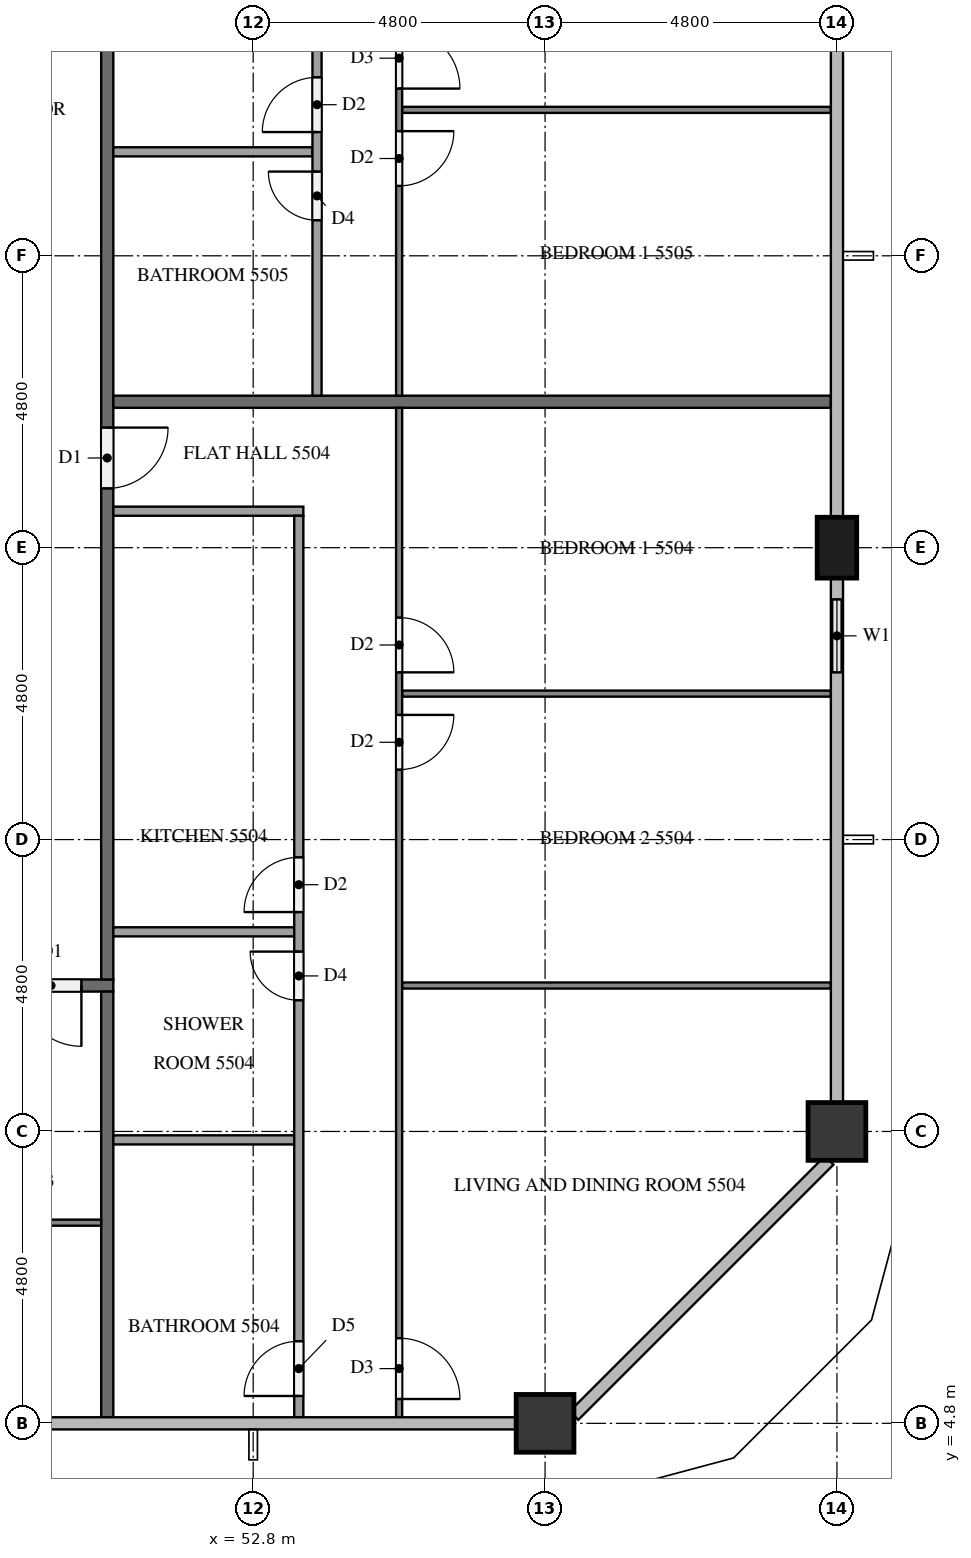
"""IFC4 building model, lengths in metres.
Left out: names, types, materials, properties, quantities, classifications, styles, units other than length and angle.
Written with IfcOpenShell. Run it as: python <this file> out.ifc"""

import sys

from ifc_helpers import new_model, si_unit, direction, frame, frame_2d, origin, origin_2d, place, context, subcontext, project, spatial, rectangle, extrude, element, fill, save


model = new_model("IFC4")
c1 = context("Model", 3, precision=1e-05, world=origin(), true_north=direction((0.0, 1.0)))
c2 = subcontext(c1, "Body", "Model", "MODEL_VIEW")
j1 = project(units=[si_unit("LENGTHUNIT", "METRE"), si_unit("PLANEANGLEUNIT", "RADIAN")], contexts=[c1])
p1 = place(None, origin())
s1 = spatial("IfcSite", under=j1, at=p1, CompositionType="ELEMENT")
p2 = place(p1, origin())
s2 = spatial("IfcBuilding", under=s1, at=p2, CompositionType="ELEMENT")
p3 = place(p2, frame((0.0, 0.0, 212.3)))
s3 = spatial("IfcBuildingStorey", under=s2, at=p3, CompositionType="ELEMENT", Elevation=212.3)
for number, where, z_axis, x_axis in (
    (1, (57.6, 4.8, 0.0), (0.0, 0.0, 1.0), (1.0, 0.0, 0.0)),
    (2, (62.4, 9.6, 0.0), (0.0, 0.0, 1.0), (1.0, 0.0, 0.0)),
):
    element("IfcColumn", number, at=place(p3, frame(where, z_axis=z_axis, x_axis=x_axis)), inside=s3, PredefinedType="COLUMN", context=c2, shape_type="SweptSolid", body=[
        extrude(rectangle(XDim=0.95, YDim=0.95, at=origin_2d()), origin(), (0.0, 0.0, 1.0), 3.2),
    ])
p4 = place(p3, frame((62.4, 19.2, 0.0), z_axis=(0.0, 0.0, 1.0), x_axis=(0.0, 1.0, 0.0)))
e3 = element("IfcColumn", 3, at=p4, inside=s3, PredefinedType="COLUMN", context=c2, shape_type="SweptSolid", body=[
    extrude(rectangle(XDim=1.0, YDim=0.65, at=origin_2d()), origin(), (0.0, 0.0, 1.0), 3.2),
])
p5 = place(p3, frame((62.4, 16.8, 0.0), z_axis=(0.0, 0.0, 1.0), x_axis=(0.0, 1.0, 0.0)))
e4 = element("IfcWall", 4, at=p5, inside=s3, PredefinedType="SOLIDWALL", context=c2, shape_type="SweptSolid", body=[
    extrude(rectangle(XDim=1.9, YDim=0.15, at=frame_2d((0.95, 0.0))), origin(), (0.0, 0.0, 1.0), 3.2),
])
p6 = place(p5, frame((0.35, 0.0, 0.9)))
e5 = element("IfcOpeningElement", 5, at=p6, cuts=e4, PredefinedType="OPENING", context=c2, shape_type="SweptSolid", body=[
    extrude(rectangle(XDim=1.2, YDim=1.4, at=frame_2d((0.6, 0.7))), frame((0.0, 0.085, 0.0), z_axis=(0.0, -1.0, 0.0), x_axis=(1.0, 0.0, 0.0)), (0.0, 0.0, 1.0), 0.17),
])
p7 = place(p3, frame((50.5, 12.0, 0.0), z_axis=(0.0, 0.0, 1.0), x_axis=(-1.0, 0.0, 0.0)))
e6 = element("IfcWall", 6, at=p7, inside=s3, PredefinedType="PARTITIONING", context=c2, shape_type="SweptSolid", body=[
    extrude(rectangle(XDim=38.6, YDim=0.2, at=frame_2d((19.3, 0.0))), origin(), (0.0, 0.0, 1.0), 3.2),
])
p8 = place(p7, frame((37.075, 0.0, 0.0)))
e7 = element("IfcOpeningElement", 7, at=p8, cuts=e6, PredefinedType="OPENING", context=c2, shape_type="SweptSolid", body=[
    extrude(rectangle(XDim=1.0, YDim=2.1, at=frame_2d((0.5, 1.05))), frame((0.0, 0.11, 0.0), z_axis=(0.0, -1.0, 0.0), x_axis=(1.0, 0.0, 0.0)), (0.0, 0.0, 1.0), 0.22),
])
p9 = place(p7, frame((20.275, 0.0, 0.0)))
e8 = element("IfcOpeningElement", 8, at=p9, cuts=e6, PredefinedType="OPENING", context=c2, shape_type="SweptSolid", body=[
    extrude(rectangle(XDim=1.0, YDim=2.1, at=frame_2d((0.5, 1.05))), frame((0.0, 0.11, 0.0), z_axis=(0.0, -1.0, 0.0), x_axis=(1.0, 0.0, 0.0)), (0.0, 0.0, 1.0), 0.22),
])
p10 = place(p7, frame((0.525, 0.0, 0.0)))
e9 = element("IfcOpeningElement", 9, at=p10, cuts=e6, PredefinedType="OPENING", context=c2, shape_type="SweptSolid", body=[
    extrude(rectangle(XDim=1.0, YDim=2.1, at=frame_2d((0.5, 1.05))), frame((0.0, 0.11, 0.0), z_axis=(0.0, -1.0, 0.0), x_axis=(1.0, 0.0, 0.0)), (0.0, 0.0, 1.0), 0.22),
])
p11 = place(p3, frame((50.4, 40.7, 0.0), z_axis=(0.0, 0.0, 1.0), x_axis=(0.0, -1.0, 0.0)))
e10 = element("IfcWall", 10, at=p11, inside=s3, PredefinedType="PARTITIONING", context=c2, shape_type="SweptSolid", body=[
    extrude(rectangle(XDim=28.6, YDim=0.2, at=frame_2d((14.3, 0.0))), origin(), (0.0, 0.0, 1.0), 3.2),
])
p12 = place(p11, frame((19.525, 0.0, 0.0)))
e11 = element("IfcOpeningElement", 11, at=p12, cuts=e10, PredefinedType="OPENING", context=c2, shape_type="SweptSolid", body=[
    extrude(rectangle(XDim=1.0, YDim=2.1, at=frame_2d((0.5, 1.05))), frame((0.0, 0.11, 0.0), z_axis=(0.0, -1.0, 0.0), x_axis=(1.0, 0.0, 0.0)), (0.0, 0.0, 1.0), 0.22),
])
p13 = place(p11, frame((7.525, 0.0, 0.0)))
e12 = element("IfcOpeningElement", 12, at=p13, cuts=e10, PredefinedType="OPENING", context=c2, shape_type="SweptSolid", body=[
    extrude(rectangle(XDim=1.0, YDim=2.1, at=frame_2d((0.5, 1.05))), frame((0.0, 0.11, 0.0), z_axis=(0.0, -1.0, 0.0), x_axis=(1.0, 0.0, 0.0)), (0.0, 0.0, 1.0), 0.22),
])
p14 = place(p11, frame((0.325, 0.0, 0.0)))
e13 = element("IfcOpeningElement", 13, at=p14, cuts=e10, PredefinedType="OPENING", context=c2, shape_type="SweptSolid", body=[
    extrude(rectangle(XDim=1.0, YDim=2.1, at=frame_2d((0.5, 1.05))), frame((0.0, 0.11, 0.0), z_axis=(0.0, -1.0, 0.0), x_axis=(1.0, 0.0, 0.0)), (0.0, 0.0, 1.0), 0.22),
])
p15 = place(p3, frame((50.4, 11.9, 0.0), z_axis=(0.0, 0.0, 1.0), x_axis=(0.0, -1.0, 0.0)))
e14 = element("IfcWall", 14, at=p15, inside=s3, PredefinedType="PARTITIONING", context=c2, shape_type="SweptSolid", body=[
    extrude(rectangle(XDim=7.0, YDim=0.2, at=frame_2d((3.5, 0.0))), origin(), (0.0, 0.0, 1.0), 3.2),
])
p16 = place(p3, frame((50.5, 21.6, 0.0), z_axis=(0.0, 0.0, 1.0), x_axis=(1.0, 0.0, 0.0)))
e15 = element("IfcWall", 15, at=p16, inside=s3, PredefinedType="PARTITIONING", context=c2, shape_type="SweptSolid", body=[
    extrude(rectangle(XDim=11.8, YDim=0.2, at=frame_2d((5.9, 0.0))), origin(), (0.0, 0.0, 1.0), 3.2),
])
p17 = place(p3, frame((50.3, 8.1, 0.0), z_axis=(0.0, 0.0, 1.0), x_axis=(-1.0, 0.0, 0.0)))
e16 = element("IfcWall", 16, at=p17, inside=s3, PredefinedType="PARTITIONING", context=c2, shape_type="SweptSolid", body=[
    extrude(rectangle(XDim=9.4, YDim=0.1, at=frame_2d((4.7, 0.0))), origin(), (0.0, 0.0, 1.0), 3.2),
])
p18 = place(p17, frame((3.35, 0.0, 0.0)))
e17 = element("IfcOpeningElement", 17, at=p18, cuts=e16, PredefinedType="OPENING", context=c2, shape_type="SweptSolid", body=[
    extrude(rectangle(XDim=1.0, YDim=2.1, at=frame_2d((0.5, 1.05))), frame((0.0, 0.06, 0.0), z_axis=(0.0, -1.0, 0.0), x_axis=(1.0, 0.0, 0.0)), (0.0, 0.0, 1.0), 0.12),
])
p19 = place(p17, frame((5.05, 0.0, 0.0)))
e18 = element("IfcOpeningElement", 18, at=p19, cuts=e16, PredefinedType="OPENING", context=c2, shape_type="SweptSolid", body=[
    extrude(rectangle(XDim=0.9, YDim=2.1, at=frame_2d((0.45, 1.05))), frame((0.0, 0.06, 0.0), z_axis=(0.0, -1.0, 0.0), x_axis=(1.0, 0.0, 0.0)), (0.0, 0.0, 1.0), 0.12),
])
for number, where, z_axis, x_axis in (
    (19, (55.25, 16.8, 0.0), (0.0, 0.0, 1.0), (1.0, 0.0, 0.0)),
    (20, (55.25, 12.0, 0.0), (0.0, 0.0, 1.0), (1.0, 0.0, 0.0)),
):
    element("IfcWall", number, at=place(p3, frame(where, z_axis=z_axis, x_axis=x_axis)), inside=s3, PredefinedType="PARTITIONING", context=c2, shape_type="SweptSolid", body=[
        extrude(rectangle(XDim=7.05, YDim=0.1, at=frame_2d((3.525, 0.0))), origin(), (0.0, 0.0, 1.0), 3.2),
    ])
p20 = place(p3, frame((55.2, 21.5, 0.0), z_axis=(0.0, 0.0, 1.0), x_axis=(0.0, -1.0, 0.0)))
e21 = element("IfcWall", 21, at=p20, inside=s3, PredefinedType="PARTITIONING", context=c2, shape_type="SweptSolid", body=[
    extrude(rectangle(XDim=16.6, YDim=0.1, at=frame_2d((8.3, 0.0))), origin(), (0.0, 0.0, 1.0), 3.2),
])
p21 = place(p20, frame((3.45, 0.0, 0.0)))
e22 = element("IfcOpeningElement", 22, at=p21, cuts=e21, PredefinedType="OPENING", context=c2, shape_type="SweptSolid", body=[
    extrude(rectangle(XDim=0.9, YDim=2.1, at=frame_2d((0.45, 1.05))), frame((0.0, 0.06, 0.0), z_axis=(0.0, -1.0, 0.0), x_axis=(1.0, 0.0, 0.0)), (0.0, 0.0, 1.0), 0.12),
])
p22 = place(p20, frame((5.05, 0.0, 0.0)))
e23 = element("IfcOpeningElement", 23, at=p22, cuts=e21, PredefinedType="OPENING", context=c2, shape_type="SweptSolid", body=[
    extrude(rectangle(XDim=0.9, YDim=2.1, at=frame_2d((0.45, 1.05))), frame((0.0, 0.06, 0.0), z_axis=(0.0, -1.0, 0.0), x_axis=(1.0, 0.0, 0.0)), (0.0, 0.0, 1.0), 0.12),
])
p23 = place(p20, frame((15.3, 0.0, 0.0)))
e24 = element("IfcOpeningElement", 24, at=p23, cuts=e21, PredefinedType="OPENING", context=c2, shape_type="SweptSolid", body=[
    extrude(rectangle(XDim=1.0, YDim=2.1, at=frame_2d((0.5, 1.05))), frame((0.0, 0.06, 0.0), z_axis=(0.0, -1.0, 0.0), x_axis=(1.0, 0.0, 0.0)), (0.0, 0.0, 1.0), 0.12),
])
for number, where, z_axis, x_axis in (
    (25, (50.5, 12.883, 0.0), (0.0, 0.0, 1.0), (1.0, 0.0, 0.0)),
    (26, (50.5, 9.461, 0.0), (0.0, 0.0, 1.0), (1.0, 0.0, 0.0)),
):
    element("IfcWall", number, at=place(p3, frame(where, z_axis=z_axis, x_axis=x_axis)), inside=s3, PredefinedType="PARTITIONING", context=c2, shape_type="SweptSolid", body=[
        extrude(rectangle(XDim=2.975, YDim=0.15, at=frame_2d((1.488, 0.0))), origin(), (0.0, 0.0, 1.0), 3.2),
    ])
p24 = place(p3, frame((50.5, 19.8, 0.0), z_axis=(0.0, 0.0, 1.0), x_axis=(1.0, 0.0, 0.0)))
e27 = element("IfcWall", 27, at=p24, inside=s3, PredefinedType="PARTITIONING", context=c2, shape_type="SweptSolid", body=[
    extrude(rectangle(XDim=3.125, YDim=0.15, at=frame_2d((1.562, 0.0))), origin(), (0.0, 0.0, 1.0), 3.2),
])
p25 = place(p3, frame((53.55, 4.9, 0.0), z_axis=(0.0, 0.0, 1.0), x_axis=(0.0, 1.0, 0.0)))
e28 = element("IfcWall", 28, at=p25, inside=s3, PredefinedType="PARTITIONING", context=c2, shape_type="SweptSolid", body=[
    extrude(rectangle(XDim=14.825, YDim=0.15, at=frame_2d((7.413, 0.0))), origin(), (0.0, 0.0, 1.0), 3.2),
])
p26 = place(p25, frame((8.308, 0.0, 0.0)))
e29 = element("IfcOpeningElement", 29, at=p26, cuts=e28, PredefinedType="OPENING", context=c2, shape_type="SweptSolid", body=[
    extrude(rectangle(XDim=0.9, YDim=2.1, at=frame_2d((0.45, 1.05))), frame((0.0, 0.085, 0.0), z_axis=(0.0, -1.0, 0.0), x_axis=(1.0, 0.0, 0.0)), (0.0, 0.0, 1.0), 0.17),
])
p27 = place(p25, frame((6.858, 0.0, 0.0)))
e30 = element("IfcOpeningElement", 30, at=p27, cuts=e28, PredefinedType="OPENING", context=c2, shape_type="SweptSolid", body=[
    extrude(rectangle(XDim=0.8, YDim=2.1, at=frame_2d((0.4, 1.05))), frame((0.0, 0.085, 0.0), z_axis=(0.0, -1.0, 0.0), x_axis=(1.0, 0.0, 0.0)), (0.0, 0.0, 1.0), 0.17),
])
p28 = place(p25, frame((0.35, 0.0, 0.0)))
e31 = element("IfcOpeningElement", 31, at=p28, cuts=e28, PredefinedType="OPENING", context=c2, shape_type="SweptSolid", body=[
    extrude(rectangle(XDim=0.9, YDim=2.1, at=frame_2d((0.45, 1.05))), frame((0.0, 0.085, 0.0), z_axis=(0.0, -1.0, 0.0), x_axis=(1.0, 0.0, 0.0)), (0.0, 0.0, 1.0), 0.17),
])
p29 = place(p3, frame((55.25, 26.4, 0.0), z_axis=(0.0, 0.0, 1.0), x_axis=(1.0, 0.0, 0.0)))
e32 = element("IfcWall", 32, at=p29, inside=s3, PredefinedType="PARTITIONING", context=c2, shape_type="SweptSolid", body=[
    extrude(rectangle(XDim=7.05, YDim=0.1, at=frame_2d((3.525, 0.0))), origin(), (0.0, 0.0, 1.0), 3.2),
])
p30 = place(p3, frame((55.2, 33.5, 0.0), z_axis=(0.0, 0.0, 1.0), x_axis=(0.0, -1.0, 0.0)))
e33 = element("IfcWall", 33, at=p30, inside=s3, PredefinedType="PARTITIONING", context=c2, shape_type="SweptSolid", body=[
    extrude(rectangle(XDim=11.8, YDim=0.1, at=frame_2d((5.9, 0.0))), origin(), (0.0, 0.0, 1.0), 3.2),
])
p31 = place(p30, frame((5.75, 0.0, 0.0)))
e34 = element("IfcOpeningElement", 34, at=p31, cuts=e33, PredefinedType="OPENING", context=c2, shape_type="SweptSolid", body=[
    extrude(rectangle(XDim=1.0, YDim=2.1, at=frame_2d((0.5, 1.05))), frame((0.0, 0.06, 0.0), z_axis=(0.0, -1.0, 0.0), x_axis=(1.0, 0.0, 0.0)), (0.0, 0.0, 1.0), 0.12),
])
p32 = place(p30, frame((7.45, 0.0, 0.0)))
e35 = element("IfcOpeningElement", 35, at=p32, cuts=e33, PredefinedType="OPENING", context=c2, shape_type="SweptSolid", body=[
    extrude(rectangle(XDim=0.9, YDim=2.1, at=frame_2d((0.45, 1.05))), frame((0.0, 0.06, 0.0), z_axis=(0.0, -1.0, 0.0), x_axis=(1.0, 0.0, 0.0)), (0.0, 0.0, 1.0), 0.12),
])
p33 = place(p3, frame((50.5, 25.71, 0.0), z_axis=(0.0, 0.0, 1.0), x_axis=(1.0, 0.0, 0.0)))
e36 = element("IfcWall", 36, at=p33, inside=s3, PredefinedType="PARTITIONING", context=c2, shape_type="SweptSolid", body=[
    extrude(rectangle(XDim=3.275, YDim=0.15, at=frame_2d((1.637, 0.0))), origin(), (0.0, 0.0, 1.0), 3.2),
])
p34 = place(p3, frame((53.85, 21.7, 0.0), z_axis=(0.0, 0.0, 1.0), x_axis=(0.0, 1.0, 0.0)))
e37 = element("IfcWall", 37, at=p34, inside=s3, PredefinedType="PARTITIONING", context=c2, shape_type="SweptSolid", body=[
    extrude(rectangle(XDim=10.025, YDim=0.15, at=frame_2d((5.013, 0.0))), origin(), (0.0, 0.0, 1.0), 3.2),
])
p35 = place(p34, frame((4.335, 0.0, 0.0)))
e38 = element("IfcOpeningElement", 38, at=p35, cuts=e37, PredefinedType="OPENING", context=c2, shape_type="SweptSolid", body=[
    extrude(rectangle(XDim=0.9, YDim=2.1, at=frame_2d((0.45, 1.05))), frame((0.0, 0.085, 0.0), z_axis=(0.0, -1.0, 0.0), x_axis=(1.0, 0.0, 0.0)), (0.0, 0.0, 1.0), 0.17),
])
p36 = place(p34, frame((2.885, 0.0, 0.0)))
e39 = element("IfcOpeningElement", 39, at=p36, cuts=e37, PredefinedType="OPENING", context=c2, shape_type="SweptSolid", body=[
    extrude(rectangle(XDim=0.8, YDim=2.1, at=frame_2d((0.4, 1.05))), frame((0.0, 0.085, 0.0), z_axis=(0.0, -1.0, 0.0), x_axis=(1.0, 0.0, 0.0)), (0.0, 0.0, 1.0), 0.17),
])
p37 = place(p6, origin())
e40 = element("IfcWindow", 40, at=p37, inside=s3, PartitioningType="SINGLE_PANEL", PredefinedType="WINDOW", context=c2, shape_type="SweptSolid", body=[
    extrude(rectangle(XDim=1.2, YDim=1.4, at=frame_2d((0.6, 0.7))), frame((0.0, 0.03, 0.0), z_axis=(0.0, -1.0, 0.0), x_axis=(1.0, 0.0, 0.0)), (0.0, 0.0, 1.0), 0.06),
])
fill(e5, e40)
p38 = place(p10, origin())
e41 = element("IfcDoor", 41, at=p38, inside=s3, OperationType="SINGLE_SWING_LEFT", PredefinedType="DOOR", context=c2, shape_type="SweptSolid", body=[
    extrude(rectangle(XDim=1.0, YDim=2.1, at=frame_2d((0.5, 1.05))), frame((0.0, 0.025, 0.0), z_axis=(0.0, -1.0, 0.0), x_axis=(1.0, 0.0, 0.0)), (0.0, 0.0, 1.0), 0.05),
])
fill(e9, e41)
p39 = place(p12, origin())
e42 = element("IfcDoor", 42, at=p39, inside=s3, OperationType="SINGLE_SWING_LEFT", PredefinedType="DOOR", context=c2, shape_type="SweptSolid", body=[
    extrude(rectangle(XDim=1.0, YDim=2.1, at=frame_2d((0.5, 1.05))), frame((0.0, 0.025, 0.0), z_axis=(0.0, -1.0, 0.0), x_axis=(1.0, 0.0, 0.0)), (0.0, 0.0, 1.0), 0.05),
])
fill(e11, e42)
p40 = place(p21, origin())
e43 = element("IfcDoor", 43, at=p40, inside=s3, OperationType="SINGLE_SWING_RIGHT", PredefinedType="DOOR", context=c2, shape_type="SweptSolid", body=[
    extrude(rectangle(XDim=0.9, YDim=2.1, at=frame_2d((0.45, 1.05))), frame((0.0, 0.025, 0.0), z_axis=(0.0, -1.0, 0.0), x_axis=(1.0, 0.0, 0.0)), (0.0, 0.0, 1.0), 0.05),
])
fill(e22, e43)
p41 = place(p22, origin())
e44 = element("IfcDoor", 44, at=p41, inside=s3, OperationType="SINGLE_SWING_LEFT", PredefinedType="DOOR", context=c2, shape_type="SweptSolid", body=[
    extrude(rectangle(XDim=0.9, YDim=2.1, at=frame_2d((0.45, 1.05))), frame((0.0, 0.025, 0.0), z_axis=(0.0, -1.0, 0.0), x_axis=(1.0, 0.0, 0.0)), (0.0, 0.0, 1.0), 0.05),
])
fill(e23, e44)
p42 = place(p23, origin())
e45 = element("IfcDoor", 45, at=p42, inside=s3, OperationType="SINGLE_SWING_RIGHT", PredefinedType="DOOR", context=c2, shape_type="SweptSolid", body=[
    extrude(rectangle(XDim=1.0, YDim=2.1, at=frame_2d((0.5, 1.05))), frame((0.0, 0.025, 0.0), z_axis=(0.0, -1.0, 0.0), x_axis=(1.0, 0.0, 0.0)), (0.0, 0.0, 1.0), 0.05),
])
fill(e24, e45)
p43 = place(p26, origin())
e46 = element("IfcDoor", 46, at=p43, inside=s3, OperationType="SINGLE_SWING_LEFT", PredefinedType="DOOR", context=c2, shape_type="SweptSolid", body=[
    extrude(rectangle(XDim=0.9, YDim=2.1, at=frame_2d((0.45, 1.05))), frame((0.0, 0.025, 0.0), z_axis=(0.0, -1.0, 0.0), x_axis=(1.0, 0.0, 0.0)), (0.0, 0.0, 1.0), 0.05),
])
fill(e29, e46)
p44 = place(p27, origin())
e47 = element("IfcDoor", 47, at=p44, inside=s3, OperationType="SINGLE_SWING_RIGHT", PredefinedType="DOOR", context=c2, shape_type="SweptSolid", body=[
    extrude(rectangle(XDim=0.8, YDim=2.1, at=frame_2d((0.4, 1.05))), frame((0.0, 0.025, 0.0), z_axis=(0.0, -1.0, 0.0), x_axis=(1.0, 0.0, 0.0)), (0.0, 0.0, 1.0), 0.05),
])
fill(e30, e47)
p45 = place(p28, origin())
e48 = element("IfcDoor", 48, at=p45, inside=s3, OperationType="SINGLE_SWING_LEFT", PredefinedType="DOOR", context=c2, shape_type="SweptSolid", body=[
    extrude(rectangle(XDim=0.9, YDim=2.1, at=frame_2d((0.45, 1.05))), frame((0.0, 0.025, 0.0), z_axis=(0.0, -1.0, 0.0), x_axis=(1.0, 0.0, 0.0)), (0.0, 0.0, 1.0), 0.05),
])
fill(e31, e48)
p46 = place(p31, origin())
e49 = element("IfcDoor", 49, at=p46, inside=s3, OperationType="SINGLE_SWING_RIGHT", PredefinedType="DOOR", context=c2, shape_type="SweptSolid", body=[
    extrude(rectangle(XDim=1.0, YDim=2.1, at=frame_2d((0.5, 1.05))), frame((0.0, 0.025, 0.0), z_axis=(0.0, -1.0, 0.0), x_axis=(1.0, 0.0, 0.0)), (0.0, 0.0, 1.0), 0.05),
])
fill(e34, e49)
p47 = place(p32, origin())
e50 = element("IfcDoor", 50, at=p47, inside=s3, OperationType="SINGLE_SWING_LEFT", PredefinedType="DOOR", context=c2, shape_type="SweptSolid", body=[
    extrude(rectangle(XDim=0.9, YDim=2.1, at=frame_2d((0.45, 1.05))), frame((0.0, 0.025, 0.0), z_axis=(0.0, -1.0, 0.0), x_axis=(1.0, 0.0, 0.0)), (0.0, 0.0, 1.0), 0.05),
])
fill(e35, e50)
p48 = place(p35, origin())
e51 = element("IfcDoor", 51, at=p48, inside=s3, OperationType="SINGLE_SWING_LEFT", PredefinedType="DOOR", context=c2, shape_type="SweptSolid", body=[
    extrude(rectangle(XDim=0.9, YDim=2.1, at=frame_2d((0.45, 1.05))), frame((0.0, 0.025, 0.0), z_axis=(0.0, -1.0, 0.0), x_axis=(1.0, 0.0, 0.0)), (0.0, 0.0, 1.0), 0.05),
])
fill(e38, e51)
p49 = place(p36, origin())
e52 = element("IfcDoor", 52, at=p49, inside=s3, OperationType="SINGLE_SWING_RIGHT", PredefinedType="DOOR", context=c2, shape_type="SweptSolid", body=[
    extrude(rectangle(XDim=0.8, YDim=2.1, at=frame_2d((0.4, 1.05))), frame((0.0, 0.025, 0.0), z_axis=(0.0, -1.0, 0.0), x_axis=(1.0, 0.0, 0.0)), (0.0, 0.0, 1.0), 0.05),
])
fill(e39, e52)
save(model, sys.argv[1])
